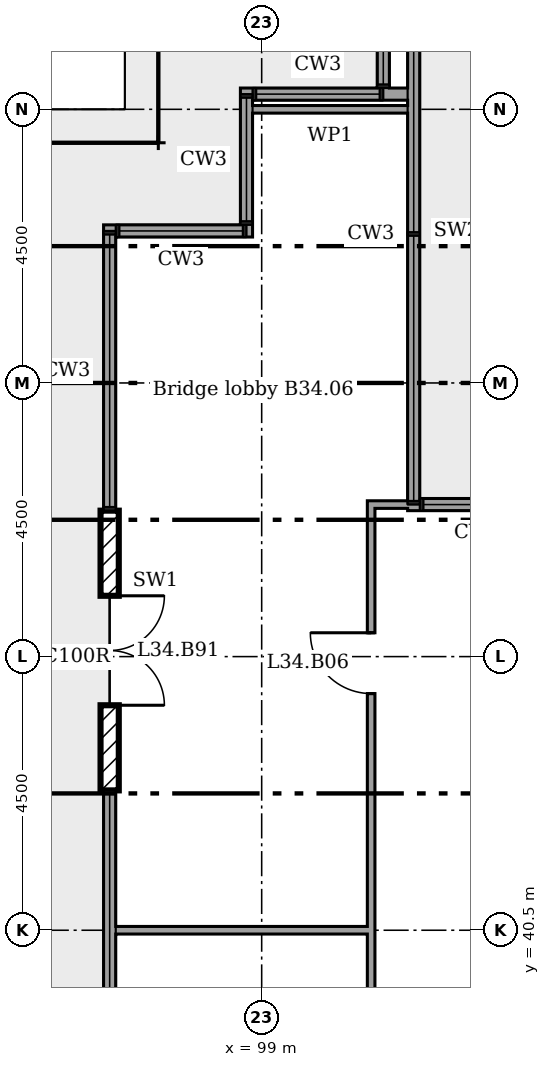
"""IFC4 building model, lengths in metres.
Left out: names, types, materials, properties, quantities, classifications, styles, units other than length and angle.
Written with IfcOpenShell. Run it as: python <this file> out.ifc"""

import sys

from ifc_helpers import new_model, si_unit, direction, frame, frame_2d, origin, place, context, subcontext, project, spatial, rectangle, extrude, element, fill, save


model = new_model("IFC4")
c1 = context("Model", 3, precision=1e-05, world=origin(), true_north=direction((0.0, 1.0)))
c2 = subcontext(c1, "Body", "Model", "MODEL_VIEW")
j1 = project(units=[si_unit("LENGTHUNIT", "METRE"), si_unit("PLANEANGLEUNIT", "RADIAN")], contexts=[c1])
p1 = place(None, origin())
s1 = spatial("IfcSite", under=j1, at=p1, CompositionType="ELEMENT")
p2 = place(p1, origin())
s2 = spatial("IfcBuilding", under=s1, at=p2, CompositionType="ELEMENT")
p3 = place(p2, frame((0.0, 0.0, 138.8)))
s3 = spatial("IfcBuildingStorey", under=s2, at=p3, CompositionType="ELEMENT", Elevation=138.8)
p4 = place(p3, frame((98.85, 52.0, 0.0), z_axis=(0.0, 0.0, 1.0), x_axis=(-1.0, 0.0, 0.0)))
e1 = element("IfcWall", 1, at=p4, inside=s3, PredefinedType="ELEMENTEDWALL", context=c2, shape_type="SweptSolid", body=[
    extrude(rectangle(XDim=2.45, YDim=0.2, at=frame_2d((1.225, 0.0))), origin(), (0.0, 0.0, 1.0), 1.8),
])
p5 = place(p3, frame((96.5, 51.9, 0.0), z_axis=(0.0, 0.0, 1.0), x_axis=(0.0, -1.0, 0.0)))
e2 = element("IfcWall", 2, at=p5, inside=s3, PredefinedType="ELEMENTEDWALL", context=c2, shape_type="SweptSolid", body=[
    extrude(rectangle(XDim=4.5, YDim=0.2, at=frame_2d((2.25, 0.0))), origin(), (0.0, 0.0, 1.0), 1.8),
])
p6 = place(p3, frame((96.5, 42.8, 0.0), z_axis=(0.0, 0.0, 1.0), x_axis=(0.0, -1.0, 0.0)))
e3 = element("IfcWall", 3, at=p6, inside=s3, PredefinedType="ELEMENTEDWALL", context=c2, shape_type="SweptSolid", body=[
    extrude(rectangle(XDim=9.4, YDim=0.2, at=frame_2d((4.7, 0.0))), origin(), (0.0, 0.0, 1.0), 1.8),
])
p7 = place(p3, frame((96.5, 47.4, 0.0), z_axis=(0.0, 0.0, 1.0), x_axis=(0.0, -1.0, 0.0)))
e4 = element("IfcWall", 4, at=p7, inside=s3, PredefinedType="ELEMENTEDWALL", context=c2, shape_type="SweptSolid", body=[
    extrude(rectangle(XDim=4.6, YDim=0.3, at=frame_2d((2.3, 0.0))), origin(), (0.0, 0.0, 1.0), 4.85),
])
p8 = place(p7, frame((1.4, 0.0, 0.0)))
e5 = element("IfcOpeningElement", 5, at=p8, cuts=e4, PredefinedType="OPENING", context=c2, shape_type="SweptSolid", body=[
    extrude(rectangle(XDim=1.8, YDim=2.4, at=frame_2d((0.9, 1.2))), frame((0.0, 0.16, 0.0), z_axis=(0.0, -1.0, 0.0), x_axis=(1.0, 0.0, 0.0)), (0.0, 0.0, 1.0), 0.32),
])
p9 = place(p3, frame((103.5, 47.5, 0.0), z_axis=(0.0, 0.0, 1.0), x_axis=(-1.0, 0.0, 0.0)))
e6 = element("IfcWall", 6, at=p9, inside=s3, PredefinedType="ELEMENTEDWALL", context=c2, shape_type="SweptSolid", body=[
    extrude(rectangle(XDim=2.1, YDim=0.2, at=frame_2d((1.05, 0.0))), origin(), (0.0, 0.0, 1.0), 1.8),
])
p10 = place(p3, frame((101.5, 47.6, 0.0), z_axis=(0.0, 0.0, 1.0), x_axis=(0.0, 1.0, 0.0)))
e7 = element("IfcWall", 7, at=p10, inside=s3, PredefinedType="ELEMENTEDWALL", context=c2, shape_type="SweptSolid", body=[
    extrude(rectangle(XDim=8.8, YDim=0.2, at=frame_2d((4.4, 0.0))), origin(), (0.0, 0.0, 1.0), 1.8),
])
p11 = place(p3, frame((101.0, 56.5, 0.0), z_axis=(0.0, 0.0, 1.0), x_axis=(0.0, -1.0, 0.0)))
e8 = element("IfcWall", 8, at=p11, inside=s3, PredefinedType="ELEMENTEDWALL", context=c2, shape_type="SweptSolid", body=[
    extrude(rectangle(XDim=2.15, YDim=0.2, at=frame_2d((1.075, 0.0))), origin(), (0.0, 0.0, 1.0), 1.8),
])
p12 = place(p3, frame((101.4, 54.25, 0.0), z_axis=(0.0, 0.0, 1.0), x_axis=(-1.0, 0.0, 0.0)))
e9 = element("IfcWall", 9, at=p12, inside=s3, PredefinedType="ELEMENTEDWALL", context=c2, shape_type="SweptSolid", body=[
    extrude(rectangle(XDim=2.75, YDim=0.2, at=frame_2d((1.375, 0.0))), origin(), (0.0, 0.0, 1.0), 1.8),
])
p13 = place(p3, frame((98.75, 54.15, 0.0), z_axis=(0.0, 0.0, 1.0), x_axis=(0.0, -1.0, 0.0)))
e10 = element("IfcWall", 10, at=p13, inside=s3, PredefinedType="ELEMENTEDWALL", context=c2, shape_type="SweptSolid", body=[
    extrude(rectangle(XDim=2.05, YDim=0.2, at=frame_2d((1.025, 0.0))), origin(), (0.0, 0.0, 1.0), 1.8),
])
p14 = place(p3, frame((96.6, 40.5, 0.0)))
e11 = element("IfcWall", 11, at=p14, inside=s3, PredefinedType="PARTITIONING", context=c2, shape_type="SweptSolid", body=[
    extrude(rectangle(XDim=4.2, YDim=0.125, at=frame_2d((2.1, 0.0))), origin(), (0.0, 0.0, 1.0), 4.251),
])
p15 = place(p3, frame((100.738, 47.5, 0.0)))
e12 = element("IfcWall", 12, at=p15, inside=s3, PredefinedType="PARTITIONING", context=c2, shape_type="SweptSolid", body=[
    extrude(rectangle(XDim=0.662, YDim=0.125, at=frame_2d((0.331, 0.0))), origin(), (0.0, 0.0, 1.0), 4.85),
])
p16 = place(p3, frame((98.85, 54.0, 0.0)))
e13 = element("IfcWall", 13, at=p16, inside=s3, PredefinedType="PARTITIONING", context=c2, shape_type="SweptSolid", body=[
    extrude(rectangle(XDim=2.55, YDim=0.125, at=frame_2d((1.275, 0.0))), origin(), (0.0, 0.0, 1.0), 4.321),
])
p17 = place(p3, frame((100.8, 33.363, 0.0), z_axis=(0.0, 0.0, 1.0), x_axis=(0.0, 1.0, 0.0)))
e14 = element("IfcWall", 14, at=p17, inside=s3, PredefinedType="PARTITIONING", context=c2, shape_type="SweptSolid", body=[
    extrude(rectangle(XDim=14.075, YDim=0.125, at=frame_2d((7.038, 0.0))), origin(), (0.0, 0.0, 1.0), 4.85),
])
p18 = place(p17, frame((2.938, 0.0, 0.0)))
e15 = element("IfcOpeningElement", 15, at=p18, cuts=e14, PredefinedType="OPENING", context=c2, shape_type="SweptSolid", body=[
    extrude(rectangle(XDim=1.2, YDim=2.1, at=frame_2d((0.6, 1.05))), frame((0.0, 0.073, 0.0), z_axis=(0.0, -1.0, 0.0), x_axis=(1.0, 0.0, 0.0)), (0.0, 0.0, 1.0), 0.145),
])
p19 = place(p17, frame((11.03, 0.0, 0.0)))
e16 = element("IfcOpeningElement", 16, at=p19, cuts=e14, PredefinedType="OPENING", context=c2, shape_type="SweptSolid", body=[
    extrude(rectangle(XDim=1.0, YDim=2.1, at=frame_2d((0.5, 1.05))), frame((0.0, 0.073, 0.0), z_axis=(0.0, -1.0, 0.0), x_axis=(1.0, 0.0, 0.0)), (0.0, 0.0, 1.0), 0.145),
])
p20 = place(p8, origin())
e17 = element("IfcDoor", 17, at=p20, inside=s3, OperationType="DOUBLE_DOOR_DOUBLE_SWING", PredefinedType="NOTDEFINED", context=c2, shape_type="SweptSolid", body=[
    extrude(rectangle(XDim=1.8, YDim=2.4, at=frame_2d((0.9, 1.2))), frame((0.0, 0.025, 0.0), z_axis=(0.0, -1.0, 0.0), x_axis=(1.0, 0.0, 0.0)), (0.0, 0.0, 1.0), 0.05),
])
fill(e5, e17)
p21 = place(p19, origin())
e18 = element("IfcDoor", 18, at=p21, inside=s3, OperationType="SINGLE_SWING_LEFT", PredefinedType="DOOR", context=c2, shape_type="SweptSolid", body=[
    extrude(rectangle(XDim=1.0, YDim=2.1, at=frame_2d((0.5, 1.05))), frame((0.0, 0.025, 0.0), z_axis=(0.0, -1.0, 0.0), x_axis=(1.0, 0.0, 0.0)), (0.0, 0.0, 1.0), 0.05),
])
fill(e16, e18)
save(model, sys.argv[1])
